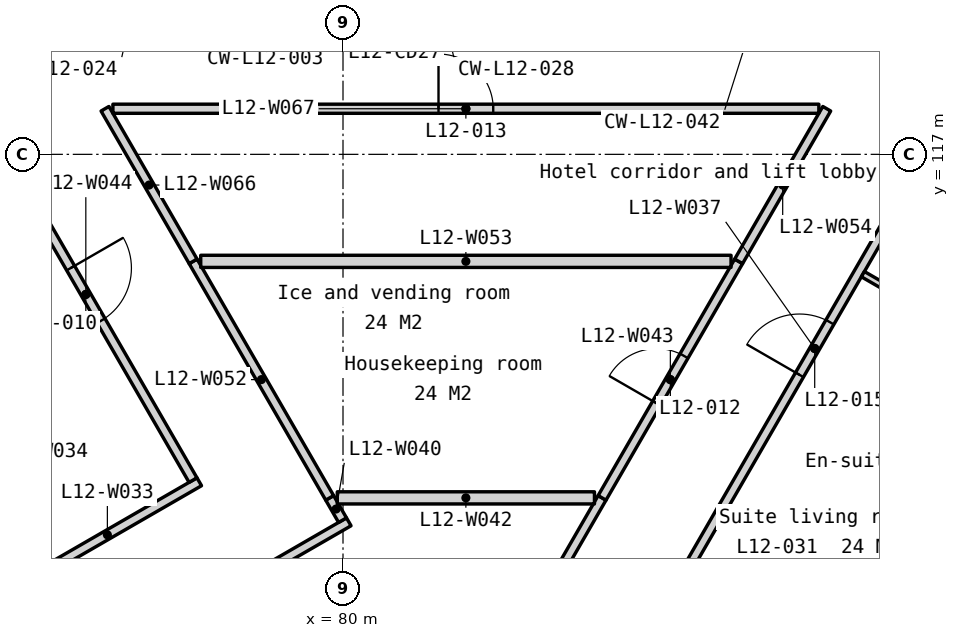
"""IFC4 building model, lengths in metres.
Left out: names, types, materials, properties, quantities, classifications, styles, units other than length and angle.
Written with IfcOpenShell. Run it as: python <this file> out.ifc"""

import sys

from ifc_helpers import new_model, si_unit, direction, frame, frame_2d, origin, place, context, subcontext, project, spatial, polyline, rectangle, outline, extrude, element, fill, save


model = new_model("IFC4")
c1 = context("Model", 3, precision=1e-05, world=origin(), true_north=direction((0.0, 1.0)))
c2 = subcontext(c1, "Body", "Model", "MODEL_VIEW")
j1 = project(units=[si_unit("LENGTHUNIT", "METRE"), si_unit("PLANEANGLEUNIT", "RADIAN")], contexts=[c1])
p1 = place(None, origin())
s1 = spatial("IfcSite", under=j1, at=p1, CompositionType="ELEMENT")
p2 = place(p1, origin())
s2 = spatial("IfcBuilding", under=s1, at=p2, CompositionType="ELEMENT")
p3 = place(p2, frame((0.0, 0.0, 56.0)))
s3 = spatial("IfcBuildingStorey", under=s2, at=p3, CompositionType="ELEMENT", Elevation=56.0)
p4 = place(p3, frame((64.305, 112.405, -0.15), z_axis=(0.0, 0.0, 1.0), x_axis=(0.499997464327, -0.866026867751, 0.0)))
e1 = element("IfcWall", 1, at=p4, inside=s3, PredefinedType="SOLIDWALL", context=c2, shape_type="SweptSolid", body=[
    extrude(outline(polyline([(25.18, 3.5), (25.18, 0.0), (0.0, 0.0), (0.0, 3.5), (25.18, 3.5)])), frame((0.0, 0.225, 0.0), z_axis=(0.0, -1.0, 0.0), x_axis=(1.0, 0.0, 0.0)), (0.0, 0.0, 1.0), 0.45),
])
p5 = place(p4, frame((5.21, 0.0, 1.05)))
e2 = element("IfcOpeningElement", 2, at=p5, cuts=e1, PredefinedType="OPENING", context=c2, shape_type="SweptSolid", body=[
    extrude(rectangle(XDim=1.8, YDim=1.5, at=frame_2d((0.9, 0.75))), frame((0.0, 0.235, 0.0), z_axis=(0.0, -1.0, 0.0), x_axis=(1.0, 0.0, 0.0)), (0.0, 0.0, 1.0), 0.47),
])
p6 = place(p4, frame((7.51, 0.0, 1.05)))
e3 = element("IfcOpeningElement", 3, at=p6, cuts=e1, PredefinedType="OPENING", context=c2, shape_type="SweptSolid", body=[
    extrude(rectangle(XDim=1.8, YDim=1.5, at=frame_2d((0.9, 0.75))), frame((0.0, 0.235, 0.0), z_axis=(0.0, -1.0, 0.0), x_axis=(1.0, 0.0, 0.0)), (0.0, 0.0, 1.0), 0.47),
])
p7 = place(p4, frame((14.17, 0.0, 1.05)))
e4 = element("IfcOpeningElement", 4, at=p7, cuts=e1, PredefinedType="OPENING", context=c2, shape_type="SweptSolid", body=[
    extrude(rectangle(XDim=1.8, YDim=1.5, at=frame_2d((0.9, 0.75))), frame((0.0, 0.235, 0.0), z_axis=(0.0, -1.0, 0.0), x_axis=(1.0, 0.0, 0.0)), (0.0, 0.0, 1.0), 0.47),
])
p8 = place(p4, frame((16.47, 0.0, 1.05)))
e5 = element("IfcOpeningElement", 5, at=p8, cuts=e1, PredefinedType="OPENING", context=c2, shape_type="SweptSolid", body=[
    extrude(rectangle(XDim=1.8, YDim=1.5, at=frame_2d((0.9, 0.75))), frame((0.0, 0.235, 0.0), z_axis=(0.0, -1.0, 0.0), x_axis=(1.0, 0.0, 0.0)), (0.0, 0.0, 1.0), 0.47),
])
p9 = place(p4, frame((23.194, 0.0, 1.05)))
e6 = element("IfcOpeningElement", 6, at=p9, cuts=e1, PredefinedType="OPENING", context=c2, shape_type="SweptSolid", body=[
    extrude(rectangle(XDim=1.2, YDim=1.5, at=frame_2d((0.6, 0.75))), frame((0.0, 0.235, 0.0), z_axis=(0.0, -1.0, 0.0), x_axis=(1.0, 0.0, 0.0)), (0.0, 0.0, 1.0), 0.47),
])
p10 = place(p3, frame((83.105, 90.599, -0.15), z_axis=(0.0, 0.0, 1.0), x_axis=(0.499999201451, 0.866025864826, 0.0)))
e7 = element("IfcWall", 7, at=p10, inside=s3, PredefinedType="SOLIDWALL", context=c2, shape_type="SweptSolid", body=[
    extrude(outline(polyline([(44.8, 0.0), (44.8, 3.5), (0.0, 3.5), (0.0, 0.0), (44.8, 0.0)])), frame((0.0, 0.225, 0.0), z_axis=(0.0, -1.0, 0.0), x_axis=(1.0, 0.0, 0.0)), (0.0, 0.0, 1.0), 0.45),
])
p11 = place(p10, frame((0.786, 0.0, 1.05)))
e8 = element("IfcOpeningElement", 8, at=p11, cuts=e7, PredefinedType="OPENING", context=c2, shape_type="SweptSolid", body=[
    extrude(rectangle(XDim=1.2, YDim=1.5, at=frame_2d((0.6, 0.75))), frame((0.0, 0.235, 0.0), z_axis=(0.0, -1.0, 0.0), x_axis=(1.0, 0.0, 0.0)), (0.0, 0.0, 1.0), 0.47),
])
p12 = place(p10, frame((6.91, 0.0, 1.05)))
e9 = element("IfcOpeningElement", 9, at=p12, cuts=e7, PredefinedType="OPENING", context=c2, shape_type="SweptSolid", body=[
    extrude(rectangle(XDim=1.8, YDim=1.5, at=frame_2d((0.9, 0.75))), frame((0.0, 0.235, 0.0), z_axis=(0.0, -1.0, 0.0), x_axis=(1.0, 0.0, 0.0)), (0.0, 0.0, 1.0), 0.47),
])
p13 = place(p10, frame((9.21, 0.0, 1.05)))
e10 = element("IfcOpeningElement", 10, at=p13, cuts=e7, PredefinedType="OPENING", context=c2, shape_type="SweptSolid", body=[
    extrude(rectangle(XDim=1.8, YDim=1.5, at=frame_2d((0.9, 0.75))), frame((0.0, 0.235, 0.0), z_axis=(0.0, -1.0, 0.0), x_axis=(1.0, 0.0, 0.0)), (0.0, 0.0, 1.0), 0.47),
])
p14 = place(p10, frame((15.87, 0.0, 1.05)))
e11 = element("IfcOpeningElement", 11, at=p14, cuts=e7, PredefinedType="OPENING", context=c2, shape_type="SweptSolid", body=[
    extrude(rectangle(XDim=1.8, YDim=1.5, at=frame_2d((0.9, 0.75))), frame((0.0, 0.235, 0.0), z_axis=(0.0, -1.0, 0.0), x_axis=(1.0, 0.0, 0.0)), (0.0, 0.0, 1.0), 0.47),
])
p15 = place(p10, frame((18.17, 0.0, 1.05)))
e12 = element("IfcOpeningElement", 12, at=p15, cuts=e7, PredefinedType="OPENING", context=c2, shape_type="SweptSolid", body=[
    extrude(rectangle(XDim=1.8, YDim=1.5, at=frame_2d((0.9, 0.75))), frame((0.0, 0.235, 0.0), z_axis=(0.0, -1.0, 0.0), x_axis=(1.0, 0.0, 0.0)), (0.0, 0.0, 1.0), 0.47),
])
p16 = place(p10, frame((24.83, 0.0, 1.05)))
e13 = element("IfcOpeningElement", 13, at=p16, cuts=e7, PredefinedType="OPENING", context=c2, shape_type="SweptSolid", body=[
    extrude(rectangle(XDim=1.8, YDim=1.5, at=frame_2d((0.9, 0.75))), frame((0.0, 0.235, 0.0), z_axis=(0.0, -1.0, 0.0), x_axis=(1.0, 0.0, 0.0)), (0.0, 0.0, 1.0), 0.47),
])
p17 = place(p10, frame((27.13, 0.0, 1.05)))
e14 = element("IfcOpeningElement", 14, at=p17, cuts=e7, PredefinedType="OPENING", context=c2, shape_type="SweptSolid", body=[
    extrude(rectangle(XDim=1.8, YDim=1.5, at=frame_2d((0.9, 0.75))), frame((0.0, 0.235, 0.0), z_axis=(0.0, -1.0, 0.0), x_axis=(1.0, 0.0, 0.0)), (0.0, 0.0, 1.0), 0.47),
])
p18 = place(p10, frame((33.79, 0.0, 1.05)))
e15 = element("IfcOpeningElement", 15, at=p18, cuts=e7, PredefinedType="OPENING", context=c2, shape_type="SweptSolid", body=[
    extrude(rectangle(XDim=1.8, YDim=1.5, at=frame_2d((0.9, 0.75))), frame((0.0, 0.235, 0.0), z_axis=(0.0, -1.0, 0.0), x_axis=(1.0, 0.0, 0.0)), (0.0, 0.0, 1.0), 0.47),
])
p19 = place(p10, frame((36.09, 0.0, 1.05)))
e16 = element("IfcOpeningElement", 16, at=p19, cuts=e7, PredefinedType="OPENING", context=c2, shape_type="SweptSolid", body=[
    extrude(rectangle(XDim=1.8, YDim=1.5, at=frame_2d((0.9, 0.75))), frame((0.0, 0.235, 0.0), z_axis=(0.0, -1.0, 0.0), x_axis=(1.0, 0.0, 0.0)), (0.0, 0.0, 1.0), 0.47),
])
p20 = place(p10, frame((42.814, 0.0, 1.05)))
e17 = element("IfcOpeningElement", 17, at=p20, cuts=e7, PredefinedType="OPENING", context=c2, shape_type="SweptSolid", body=[
    extrude(rectangle(XDim=1.2, YDim=1.5, at=frame_2d((0.6, 0.75))), frame((0.0, 0.235, 0.0), z_axis=(0.0, -1.0, 0.0), x_axis=(1.0, 0.0, 0.0)), (0.0, 0.0, 1.0), 0.47),
])
p21 = place(p3, frame((74.614, 109.87, 0.0), z_axis=(0.0, 0.0, 1.0), x_axis=(0.866043466982, 0.49996871232, 0.0)))
e18 = element("IfcWall", 18, at=p21, inside=s3, PredefinedType="PARTITIONING", context=c2, shape_type="SweptSolid", body=[
    extrude(rectangle(XDim=3.49, YDim=0.15, at=frame_2d((1.745, 0.0))), origin(), (0.0, 0.0, 1.0), 3.35),
])
p22 = place(p3, frame((85.505, 109.906, 0.0), z_axis=(0.0, 0.0, 1.0), x_axis=(0.500017993482, 0.866015014994, 0.0)))
e19 = element("IfcWall", 19, at=p22, inside=s3, PredefinedType="PARTITIONING", context=c2, shape_type="SweptSolid", body=[
    extrude(rectangle(XDim=9.01, YDim=0.15, at=frame_2d((4.505, 0.0))), origin(), (0.0, 0.0, 1.0), 3.35),
])
p23 = place(p22, frame((4.005, 0.0, 0.0)))
e20 = element("IfcOpeningElement", 20, at=p23, cuts=e19, PredefinedType="OPENING", context=c2, shape_type="SweptSolid", body=[
    extrude(rectangle(XDim=1.0, YDim=2.1, at=frame_2d((0.5, 1.05))), frame((0.0, 0.085, 0.0), z_axis=(0.0, -1.0, 0.0), x_axis=(1.0, 0.0, 0.0)), (0.0, 0.0, 1.0), 0.17),
])
p24 = place(p3, frame((77.073, 109.211, 0.0), z_axis=(0.0, 0.0, 1.0), x_axis=(0.866013176292, 0.50002117804, 0.0)))
e21 = element("IfcWall", 21, at=p24, inside=s3, PredefinedType="PARTITIONING", context=c2, shape_type="SweptSolid", body=[
    extrude(rectangle(XDim=3.49, YDim=0.15, at=frame_2d((1.745, 0.0))), origin(), (0.0, 0.0, 1.0), 3.35),
])
p25 = place(p3, frame((79.781, 111.35, 0.0), z_axis=(0.0, 0.0, 1.0), x_axis=(0.499739105689, -0.866175978797, 0.0)))
e22 = element("IfcWall", 22, at=p25, inside=s3, PredefinedType="PARTITIONING", context=c2, shape_type="SweptSolid", body=[
    extrude(rectangle(XDim=0.423, YDim=0.15, at=frame_2d((0.211, 0.0))), origin(), (0.0, 0.0, 1.0), 3.35),
])
p26 = place(p3, frame((80.065, 104.083, 0.0), z_axis=(0.0, 0.0, 1.0), x_axis=(0.49999109456, 0.866030545282, 0.0)))
e23 = element("IfcWall", 23, at=p26, inside=s3, PredefinedType="PARTITIONING", context=c2, shape_type="SweptSolid", body=[
    extrude(rectangle(XDim=8.391, YDim=0.15, at=frame_2d((4.196, 0.0))), origin(), (0.0, 0.0, 1.0), 3.35),
])
p27 = place(p26, frame((3.746, 0.0, 0.0)))
e24 = element("IfcOpeningElement", 24, at=p27, cuts=e23, PredefinedType="OPENING", context=c2, shape_type="SweptSolid", body=[
    extrude(rectangle(XDim=0.9, YDim=2.1, at=frame_2d((0.45, 1.05))), frame((0.0, 0.085, 0.0), z_axis=(0.0, -1.0, 0.0), x_axis=(1.0, 0.0, 0.0)), (0.0, 0.0, 1.0), 0.17),
])
p28 = place(p3, frame((79.906, 111.35, 0.0), z_axis=(0.0, 0.0, 1.0), x_axis=(1.0, 0.0, 0.0)))
e25 = element("IfcWall", 25, at=p28, inside=s3, PredefinedType="PARTITIONING", context=c2, shape_type="SweptSolid", body=[
    extrude(rectangle(XDim=4.229, YDim=0.2, at=frame_2d((2.115, 0.0))), origin(), (0.0, 0.0, 1.0), 3.35),
])
p29 = place(p3, frame((84.26, 111.35, 0.0), z_axis=(0.0, 0.0, 1.0), x_axis=(0.500003186274, 0.866023564181, 0.0)))
e26 = element("IfcWall", 26, at=p29, inside=s3, PredefinedType="PARTITIONING", context=c2, shape_type="SweptSolid", body=[
    extrude(rectangle(XDim=4.492, YDim=0.15, at=frame_2d((2.246, 0.0))), origin(), (0.0, 0.0, 1.0), 3.35),
])
p30 = place(p29, frame((1.796, 0.0, 0.0)))
e27 = element("IfcOpeningElement", 27, at=p30, cuts=e26, PredefinedType="OPENING", context=c2, shape_type="SweptSolid", body=[
    extrude(rectangle(XDim=0.9, YDim=2.1, at=frame_2d((0.45, 1.05))), frame((0.0, 0.085, 0.0), z_axis=(0.0, -1.0, 0.0), x_axis=(1.0, 0.0, 0.0)), (0.0, 0.0, 1.0), 0.17),
])
p31 = place(p3, frame((74.007, 117.75, 0.0), z_axis=(0.0, 0.0, 1.0), x_axis=(0.500026110575, -0.866010328312, 0.0)))
e28 = element("IfcWall", 28, at=p31, inside=s3, PredefinedType="PARTITIONING", context=c2, shape_type="SweptSolid", body=[
    extrude(rectangle(XDim=7.052, YDim=0.15, at=frame_2d((3.526, 0.0))), origin(), (0.0, 0.0, 1.0), 3.35),
])
p32 = place(p31, frame((3.026, 0.0, 0.0)))
e29 = element("IfcOpeningElement", 29, at=p32, cuts=e28, PredefinedType="OPENING", context=c2, shape_type="SweptSolid", body=[
    extrude(rectangle(XDim=1.0, YDim=2.1, at=frame_2d((0.5, 1.05))), frame((0.0, 0.085, 0.0), z_axis=(0.0, -1.0, 0.0), x_axis=(1.0, 0.0, 0.0)), (0.0, 0.0, 1.0), 0.17),
])
p33 = place(p3, frame((88.55, 115.03, 0.0), z_axis=(0.0, 0.0, 1.0), x_axis=(0.866012076814, -0.50002308228, 0.0)))
e30 = element("IfcWall", 30, at=p33, inside=s3, PredefinedType="PARTITIONING", context=c2, shape_type="SweptSolid", body=[
    extrude(rectangle(XDim=2.765, YDim=0.1, at=frame_2d((1.382, 0.0))), origin(), (0.0, 0.0, 1.0), 3.35),
])
p34 = place(p3, frame((77.535, 115.24, 0.0), z_axis=(0.0, 0.0, 1.0), x_axis=(0.500043949999, -0.866000027754, 0.0)))
e31 = element("IfcWall", 31, at=p34, inside=s3, PredefinedType="PARTITIONING", context=c2, shape_type="SweptSolid", body=[
    extrude(rectangle(XDim=4.492, YDim=0.15, at=frame_2d((2.246, 0.0))), origin(), (0.0, 0.0, 1.0), 3.35),
])
p35 = place(p3, frame((77.66, 115.24, 0.0), z_axis=(0.0, 0.0, 1.0), x_axis=(1.0, 0.0, 0.0)))
e32 = element("IfcWall", 32, at=p35, inside=s3, PredefinedType="PARTITIONING", context=c2, shape_type="SweptSolid", body=[
    extrude(rectangle(XDim=8.721, YDim=0.2, at=frame_2d((4.361, 0.0))), origin(), (0.0, 0.0, 1.0), 3.35),
])
p36 = place(p3, frame((86.506, 115.24, 0.0), z_axis=(0.0, 0.0, 1.0), x_axis=(0.500016544581, 0.866015851556, 0.0)))
e33 = element("IfcWall", 33, at=p36, inside=s3, PredefinedType="PARTITIONING", context=c2, shape_type="SweptSolid", body=[
    extrude(rectangle(XDim=2.898, YDim=0.15, at=frame_2d((1.449, 0.0))), origin(), (0.0, 0.0, 1.0), 3.35),
])
p37 = place(p3, frame((88.851, 108.101, 0.0), z_axis=(0.0, 0.0, 1.0), x_axis=(0.500004234368, 0.866022959057, 0.0)))
e34 = element("IfcWall", 34, at=p37, inside=s3, PredefinedType="PARTITIONING", context=c2, shape_type="SweptSolid", body=[
    extrude(rectangle(XDim=8.75, YDim=0.1, at=frame_2d((4.375, 0.0))), origin(), (0.0, 0.0, 1.0), 3.35),
])
p38 = place(p37, frame((3.925, 0.0, 0.0)))
e35 = element("IfcOpeningElement", 35, at=p38, cuts=e34, PredefinedType="OPENING", context=c2, shape_type="SweptSolid", body=[
    extrude(rectangle(XDim=0.9, YDim=2.1, at=frame_2d((0.45, 1.05))), frame((0.0, 0.06, 0.0), z_axis=(0.0, -1.0, 0.0), x_axis=(1.0, 0.0, 0.0)), (0.0, 0.0, 1.0), 0.12),
])
p39 = place(p3, frame((76.086, 117.75, 0.0), z_axis=(0.0, 0.0, 1.0), x_axis=(0.499953366038, -0.866052326241, 0.0)))
e36 = element("IfcWall", 36, at=p39, inside=s3, PredefinedType="PARTITIONING", context=c2, shape_type="SweptSolid", body=[
    extrude(rectangle(XDim=2.898, YDim=0.15, at=frame_2d((1.449, 0.0))), origin(), (0.0, 0.0, 1.0), 3.35),
])
p40 = place(p3, frame((76.216, 117.75, 0.0), z_axis=(0.0, 0.0, 1.0), x_axis=(1.0, 0.0, 0.0)))
e37 = element("IfcWall", 37, at=p40, inside=s3, PredefinedType="PARTITIONING", context=c2, shape_type="SweptSolid", body=[
    extrude(rectangle(XDim=11.61, YDim=0.15, at=frame_2d((5.805, 0.0))), origin(), (0.0, 0.0, 1.0), 3.35),
])
p41 = place(p40, frame((5.355, 0.0, 0.0)))
e38 = element("IfcOpeningElement", 38, at=p41, cuts=e37, PredefinedType="OPENING", context=c2, shape_type="SweptSolid", body=[
    extrude(rectangle(XDim=0.9, YDim=2.1, at=frame_2d((0.45, 1.05))), frame((0.0, 0.085, 0.0), z_axis=(0.0, -1.0, 0.0), x_axis=(1.0, 0.0, 0.0)), (0.0, 0.0, 1.0), 0.17),
])
p42 = place(p32, origin())
e39 = element("IfcDoor", 39, at=p42, inside=s3, OperationType="SINGLE_SWING_LEFT", PredefinedType="DOOR", context=c2, shape_type="SweptSolid", body=[
    extrude(rectangle(XDim=1.0, YDim=2.1, at=frame_2d((0.5, 1.05))), frame((0.0, 0.025, 0.0), z_axis=(0.0, -1.0, 0.0), x_axis=(1.0, 0.0, 0.0)), (0.0, 0.0, 1.0), 0.05),
])
fill(e29, e39)
p43 = place(p30, origin())
e40 = element("IfcDoor", 40, at=p43, inside=s3, OperationType="SINGLE_SWING_LEFT", PredefinedType="DOOR", context=c2, shape_type="SweptSolid", body=[
    extrude(rectangle(XDim=0.9, YDim=2.1, at=frame_2d((0.45, 1.05))), frame((0.0, 0.025, 0.0), z_axis=(0.0, -1.0, 0.0), x_axis=(1.0, 0.0, 0.0)), (0.0, 0.0, 1.0), 0.05),
])
fill(e27, e40)
p44 = place(p41, origin())
e41 = element("IfcDoor", 41, at=p44, inside=s3, OperationType="SINGLE_SWING_LEFT", PredefinedType="DOOR", context=c2, shape_type="SweptSolid", body=[
    extrude(rectangle(XDim=0.9, YDim=2.1, at=frame_2d((0.45, 1.05))), frame((0.0, 0.025, 0.0), z_axis=(0.0, -1.0, 0.0), x_axis=(1.0, 0.0, 0.0)), (0.0, 0.0, 1.0), 0.05),
])
fill(e38, e41)
p45 = place(p23, origin())
e42 = element("IfcDoor", 42, at=p45, inside=s3, OperationType="SINGLE_SWING_LEFT", PredefinedType="DOOR", context=c2, shape_type="SweptSolid", body=[
    extrude(rectangle(XDim=1.0, YDim=2.1, at=frame_2d((0.5, 1.05))), frame((0.0, 0.025, 0.0), z_axis=(0.0, -1.0, 0.0), x_axis=(1.0, 0.0, 0.0)), (0.0, 0.0, 1.0), 0.05),
])
fill(e20, e42)
save(model, sys.argv[1])
